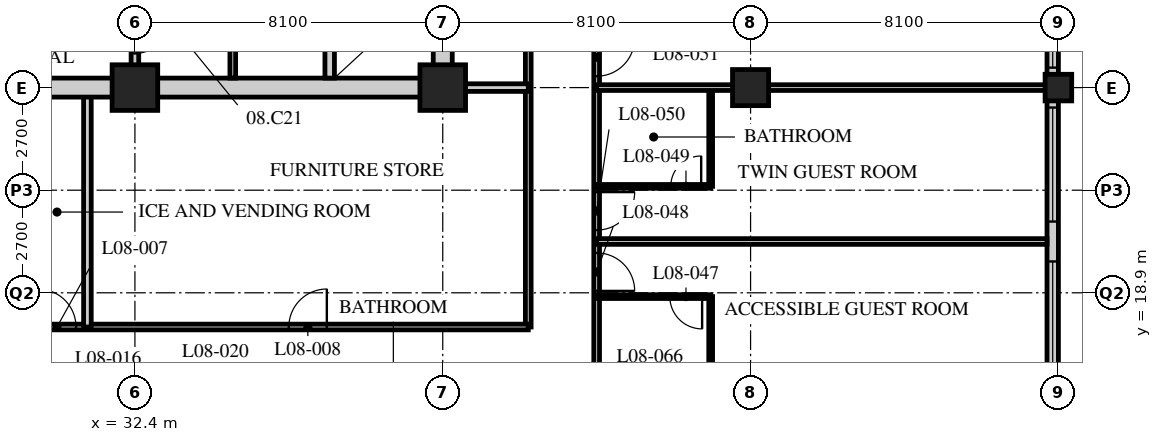
"""IFC4 building model, lengths in metres.
Left out: names, types, materials, properties, quantities, classifications, styles, units other than length and angle.
Written with IfcOpenShell. Run it as: python <this file> out.ifc"""

import sys

from ifc_helpers import new_model, si_unit, direction, frame, frame_2d, origin, origin_2d, place, context, subcontext, project, spatial, rectangle, hollow_rectangle, extrude, element, fill, save


model = new_model("IFC4")
c1 = context("Model", 3, precision=1e-05, world=origin(), true_north=direction((0.0, 1.0)))
c2 = subcontext(c1, "Body", "Model", "MODEL_VIEW")
j1 = project(units=[si_unit("LENGTHUNIT", "METRE"), si_unit("PLANEANGLEUNIT", "RADIAN")], contexts=[c1])
p1 = place(None, origin())
s1 = spatial("IfcSite", under=j1, at=p1, CompositionType="ELEMENT")
p2 = place(p1, origin())
s2 = spatial("IfcBuilding", under=s1, at=p2, CompositionType="ELEMENT")
p3 = place(p2, frame((0.0, 0.0, 39.8)))
s3 = spatial("IfcBuildingStorey", under=s2, at=p3, CompositionType="ELEMENT", Elevation=39.8)
for number, where, z_axis, x_axis in (
    (1, (32.4, 24.3, 0.0), (0.0, 0.0, 1.0), (1.0, 0.0, 0.0)),
    (2, (40.5, 24.3, 0.0), (0.0, 0.0, 1.0), (1.0, 0.0, 0.0)),
):
    element("IfcColumn", number, at=place(p3, frame(where, z_axis=z_axis, x_axis=x_axis)), inside=s3, PredefinedType="COLUMN", context=c2, shape_type="SweptSolid", body=[
        extrude(hollow_rectangle(XDim=1.2, YDim=1.2, WallThickness=0.12, at=origin_2d()), origin(), (0.0, 0.0, 1.0), 3.4),
    ])
p4 = place(p3, frame((48.6, 24.3, 0.0), z_axis=(0.0, 0.0, 1.0), x_axis=(1.0, 0.0, 0.0)))
e3 = element("IfcColumn", 3, at=p4, inside=s3, PredefinedType="COLUMN", context=c2, shape_type="SweptSolid", body=[
    extrude(hollow_rectangle(XDim=0.95, YDim=0.95, WallThickness=0.095, at=origin_2d()), origin(), (0.0, 0.0, 1.0), 3.4),
])
p5 = place(p3, frame((56.7, 24.3, 0.0), z_axis=(0.0, 0.0, 1.0), x_axis=(1.0, 0.0, 0.0)))
e4 = element("IfcColumn", 4, at=p5, inside=s3, PredefinedType="COLUMN", context=c2, shape_type="SweptSolid", body=[
    extrude(hollow_rectangle(XDim=0.7, YDim=0.7, WallThickness=0.06, at=origin_2d()), origin(), (0.0, 0.0, 1.0), 3.4),
])
p6 = place(p3, frame((56.55, 8.4, 0.0), z_axis=(0.0, 0.0, 1.0), x_axis=(0.0, 1.0, 0.0)))
e5 = element("IfcWall", 5, at=p6, inside=s3, PredefinedType="SOLIDWALL", context=c2, shape_type="SweptSolid", body=[
    extrude(rectangle(XDim=32.1, YDim=0.3, at=frame_2d((16.05, 0.0))), origin(), (0.0, 0.0, 1.0), 3.19),
])
p7 = place(p6, frame((0.225, 0.0, 0.9)))
e6 = element("IfcOpeningElement", 6, at=p7, cuts=e5, PredefinedType="OPENING", context=c2, shape_type="SweptSolid", body=[
    extrude(rectangle(XDim=3.0, YDim=2.0, at=frame_2d((1.5, 1.0))), frame((0.0, 0.16, 0.0), z_axis=(0.0, -1.0, 0.0), x_axis=(1.0, 0.0, 0.0)), (0.0, 0.0, 1.0), 0.32),
])
p8 = place(p6, frame((4.275, 0.0, 0.9)))
e7 = element("IfcOpeningElement", 7, at=p8, cuts=e5, PredefinedType="OPENING", context=c2, shape_type="SweptSolid", body=[
    extrude(rectangle(XDim=3.0, YDim=2.0, at=frame_2d((1.5, 1.0))), frame((0.0, 0.16, 0.0), z_axis=(0.0, -1.0, 0.0), x_axis=(1.0, 0.0, 0.0)), (0.0, 0.0, 1.0), 0.32),
])
p9 = place(p6, frame((8.325, 0.0, 0.9)))
e8 = element("IfcOpeningElement", 8, at=p9, cuts=e5, PredefinedType="OPENING", context=c2, shape_type="SweptSolid", body=[
    extrude(rectangle(XDim=3.0, YDim=2.0, at=frame_2d((1.5, 1.0))), frame((0.0, 0.16, 0.0), z_axis=(0.0, -1.0, 0.0), x_axis=(1.0, 0.0, 0.0)), (0.0, 0.0, 1.0), 0.32),
])
p10 = place(p6, frame((12.375, 0.0, 0.9)))
e9 = element("IfcOpeningElement", 9, at=p10, cuts=e5, PredefinedType="OPENING", context=c2, shape_type="SweptSolid", body=[
    extrude(rectangle(XDim=3.0, YDim=2.0, at=frame_2d((1.5, 1.0))), frame((0.0, 0.16, 0.0), z_axis=(0.0, -1.0, 0.0), x_axis=(1.0, 0.0, 0.0)), (0.0, 0.0, 1.0), 0.32),
])
p11 = place(p6, frame((16.425, 0.0, 0.9)))
e10 = element("IfcOpeningElement", 10, at=p11, cuts=e5, PredefinedType="OPENING", context=c2, shape_type="SweptSolid", body=[
    extrude(rectangle(XDim=3.0, YDim=2.0, at=frame_2d((1.5, 1.0))), frame((0.0, 0.16, 0.0), z_axis=(0.0, -1.0, 0.0), x_axis=(1.0, 0.0, 0.0)), (0.0, 0.0, 1.0), 0.32),
])
p12 = place(p6, frame((20.475, 0.0, 0.9)))
e11 = element("IfcOpeningElement", 11, at=p12, cuts=e5, PredefinedType="OPENING", context=c2, shape_type="SweptSolid", body=[
    extrude(rectangle(XDim=3.0, YDim=2.0, at=frame_2d((1.5, 1.0))), frame((0.0, 0.16, 0.0), z_axis=(0.0, -1.0, 0.0), x_axis=(1.0, 0.0, 0.0)), (0.0, 0.0, 1.0), 0.32),
])
p13 = place(p6, frame((24.525, 0.0, 0.9)))
e12 = element("IfcOpeningElement", 12, at=p13, cuts=e5, PredefinedType="OPENING", context=c2, shape_type="SweptSolid", body=[
    extrude(rectangle(XDim=3.0, YDim=2.0, at=frame_2d((1.5, 1.0))), frame((0.0, 0.16, 0.0), z_axis=(0.0, -1.0, 0.0), x_axis=(1.0, 0.0, 0.0)), (0.0, 0.0, 1.0), 0.32),
])
p14 = place(p6, frame((28.575, 0.0, 0.9)))
e13 = element("IfcOpeningElement", 13, at=p14, cuts=e5, PredefinedType="OPENING", context=c2, shape_type="SweptSolid", body=[
    extrude(rectangle(XDim=3.0, YDim=2.0, at=frame_2d((1.5, 1.0))), frame((0.0, 0.16, 0.0), z_axis=(0.0, -1.0, 0.0), x_axis=(1.0, 0.0, 0.0)), (0.0, 0.0, 1.0), 0.32),
])
p15 = place(p3, frame((44.55, 16.2, 0.0), z_axis=(0.0, 0.0, 1.0), x_axis=(0.0, 1.0, 0.0)))
e14 = element("IfcWall", 14, at=p15, inside=s3, PredefinedType="PARTITIONING", context=c2, shape_type="SweptSolid", body=[
    extrude(rectangle(XDim=26.1, YDim=0.15, at=frame_2d((13.05, 0.0))), origin(), (0.0, 0.0, 1.0), 3.19),
])
p16 = place(p15, frame((2.75, 0.0, 0.0)))
e15 = element("IfcOpeningElement", 15, at=p16, cuts=e14, PredefinedType="OPENING", context=c2, shape_type="SweptSolid", body=[
    extrude(rectangle(XDim=1.0, YDim=2.1, at=frame_2d((0.5, 1.05))), frame((0.0, 0.085, 0.0), z_axis=(0.0, -1.0, 0.0), x_axis=(1.0, 0.0, 0.0)), (0.0, 0.0, 1.0), 0.17),
])
p17 = place(p15, frame((4.35, 0.0, 0.0)))
e16 = element("IfcOpeningElement", 16, at=p17, cuts=e14, PredefinedType="OPENING", context=c2, shape_type="SweptSolid", body=[
    extrude(rectangle(XDim=1.0, YDim=2.1, at=frame_2d((0.5, 1.05))), frame((0.0, 0.085, 0.0), z_axis=(0.0, -1.0, 0.0), x_axis=(1.0, 0.0, 0.0)), (0.0, 0.0, 1.0), 0.17),
])
p18 = place(p15, frame((8.4, 0.0, 0.0)))
e17 = element("IfcOpeningElement", 17, at=p18, cuts=e14, PredefinedType="OPENING", context=c2, shape_type="SweptSolid", body=[
    extrude(rectangle(XDim=1.0, YDim=2.1, at=frame_2d((0.5, 1.05))), frame((0.0, 0.085, 0.0), z_axis=(0.0, -1.0, 0.0), x_axis=(1.0, 0.0, 0.0)), (0.0, 0.0, 1.0), 0.17),
])
p19 = place(p15, frame((14.6, 0.0, 0.0)))
e18 = element("IfcOpeningElement", 18, at=p19, cuts=e14, PredefinedType="OPENING", context=c2, shape_type="SweptSolid", body=[
    extrude(rectangle(XDim=1.0, YDim=2.1, at=frame_2d((0.5, 1.05))), frame((0.0, 0.085, 0.0), z_axis=(0.0, -1.0, 0.0), x_axis=(1.0, 0.0, 0.0)), (0.0, 0.0, 1.0), 0.17),
])
p20 = place(p15, frame((18.65, 0.0, 0.0)))
e19 = element("IfcOpeningElement", 19, at=p20, cuts=e14, PredefinedType="OPENING", context=c2, shape_type="SweptSolid", body=[
    extrude(rectangle(XDim=1.0, YDim=2.1, at=frame_2d((0.5, 1.05))), frame((0.0, 0.085, 0.0), z_axis=(0.0, -1.0, 0.0), x_axis=(1.0, 0.0, 0.0)), (0.0, 0.0, 1.0), 0.17),
])
p21 = place(p15, frame((22.65, 0.0, 0.0)))
e20 = element("IfcOpeningElement", 20, at=p21, cuts=e14, PredefinedType="OPENING", context=c2, shape_type="SweptSolid", body=[
    extrude(rectangle(XDim=1.0, YDim=2.1, at=frame_2d((0.5, 1.05))), frame((0.0, 0.085, 0.0), z_axis=(0.0, -1.0, 0.0), x_axis=(1.0, 0.0, 0.0)), (0.0, 0.0, 1.0), 0.17),
])
p22 = place(p3, frame((42.75, 18.0, 0.0), z_axis=(0.0, 0.0, 1.0), x_axis=(0.0, 1.0, 0.0)))
e21 = element("IfcWall", 21, at=p22, inside=s3, PredefinedType="PARTITIONING", context=c2, shape_type="SweptSolid", body=[
    extrude(rectangle(XDim=22.5, YDim=0.15, at=frame_2d((11.25, 0.0))), origin(), (0.0, 0.0, 1.0), 3.19),
])
p23 = place(p22, frame((9.85, 0.0, 0.0)))
e22 = element("IfcOpeningElement", 22, at=p23, cuts=e21, PredefinedType="OPENING", context=c2, shape_type="SweptSolid", body=[
    extrude(rectangle(XDim=1.0, YDim=2.1, at=frame_2d((0.5, 1.05))), frame((0.0, 0.085, 0.0), z_axis=(0.0, -1.0, 0.0), x_axis=(1.0, 0.0, 0.0)), (0.0, 0.0, 1.0), 0.17),
])
p24 = place(p22, frame((17.95, 0.0, 0.0)))
e23 = element("IfcOpeningElement", 23, at=p24, cuts=e21, PredefinedType="OPENING", context=c2, shape_type="SweptSolid", body=[
    extrude(rectangle(XDim=1.0, YDim=2.1, at=frame_2d((0.5, 1.05))), frame((0.0, 0.085, 0.0), z_axis=(0.0, -1.0, 0.0), x_axis=(1.0, 0.0, 0.0)), (0.0, 0.0, 1.0), 0.17),
])
p25 = place(p3, frame((29.56, 18.0, 0.0), z_axis=(0.0, 0.0, 1.0), x_axis=(1.0, 0.0, 0.0)))
e24 = element("IfcWall", 24, at=p25, inside=s3, PredefinedType="PARTITIONING", context=c2, shape_type="SweptSolid", body=[
    extrude(rectangle(XDim=13.19, YDim=0.15, at=frame_2d((6.595, 0.0))), origin(), (0.0, 0.0, 1.0), 3.19),
])
p26 = place(p25, frame((0.29, 0.0, 0.0)))
e25 = element("IfcOpeningElement", 25, at=p26, cuts=e24, PredefinedType="OPENING", context=c2, shape_type="SweptSolid", body=[
    extrude(rectangle(XDim=1.0, YDim=2.1, at=frame_2d((0.5, 1.05))), frame((0.0, 0.085, 0.0), z_axis=(0.0, -1.0, 0.0), x_axis=(1.0, 0.0, 0.0)), (0.0, 0.0, 1.0), 0.17),
])
p27 = place(p25, frame((6.89, 0.0, 0.0)))
e26 = element("IfcOpeningElement", 26, at=p27, cuts=e24, PredefinedType="OPENING", context=c2, shape_type="SweptSolid", body=[
    extrude(rectangle(XDim=1.0, YDim=2.1, at=frame_2d((0.5, 1.05))), frame((0.0, 0.085, 0.0), z_axis=(0.0, -1.0, 0.0), x_axis=(1.0, 0.0, 0.0)), (0.0, 0.0, 1.0), 0.17),
])
p28 = place(p3, frame((31.15, 18.0, 0.0), z_axis=(0.0, 0.0, 1.0), x_axis=(0.0, 1.0, 0.0)))
e27 = element("IfcWall", 27, at=p28, inside=s3, PredefinedType="SOLIDWALL", context=c2, shape_type="SweptSolid", body=[
    extrude(rectangle(XDim=6.3, YDim=0.2, at=frame_2d((3.15, 0.0))), origin(), (0.0, 0.0, 1.0), 3.19),
])
p29 = place(p3, frame((40.5, 24.3, 0.0), z_axis=(0.0, 0.0, 1.0), x_axis=(1.0, 0.0, 0.0)))
e28 = element("IfcWall", 28, at=p29, inside=s3, PredefinedType="SOLIDWALL", context=c2, shape_type="SweptSolid", body=[
    extrude(rectangle(XDim=2.25, YDim=0.2, at=frame_2d((1.125, 0.0))), origin(), (0.0, 0.0, 1.0), 2.578),
])
p30 = place(p3, frame((47.55, 16.2, 0.0), z_axis=(0.0, 0.0, 1.0), x_axis=(0.0, 1.0, 0.0)))
e29 = element("IfcWall", 29, at=p30, inside=s3, PredefinedType="PARTITIONING", context=c2, shape_type="SweptSolid", body=[
    extrude(rectangle(XDim=2.6, YDim=0.1, at=frame_2d((1.3, 0.0))), origin(), (0.0, 0.0, 1.0), 3.19),
])
p31 = place(p3, frame((44.55, 18.8, 0.0), z_axis=(0.0, 0.0, 1.0), x_axis=(1.0, 0.0, 0.0)))
e30 = element("IfcWall", 30, at=p31, inside=s3, PredefinedType="PARTITIONING", context=c2, shape_type="SweptSolid", body=[
    extrude(rectangle(XDim=3.0, YDim=0.1, at=frame_2d((1.5, 0.0))), origin(), (0.0, 0.0, 1.0), 3.19),
])
p32 = place(p31, frame((1.925, 0.0, 0.0)))
e31 = element("IfcOpeningElement", 31, at=p32, cuts=e30, PredefinedType="OPENING", context=c2, shape_type="SweptSolid", body=[
    extrude(rectangle(XDim=0.85, YDim=2.1, at=frame_2d((0.425, 1.05))), frame((0.0, 0.06, 0.0), z_axis=(0.0, -1.0, 0.0), x_axis=(1.0, 0.0, 0.0)), (0.0, 0.0, 1.0), 0.12),
])
p33 = place(p3, frame((44.55, 20.25, 0.0), z_axis=(0.0, 0.0, 1.0), x_axis=(1.0, 0.0, 0.0)))
e32 = element("IfcWall", 32, at=p33, inside=s3, PredefinedType="PARTITIONING", context=c2, shape_type="SweptSolid", body=[
    extrude(rectangle(XDim=11.85, YDim=0.15, at=frame_2d((5.925, 0.0))), origin(), (0.0, 0.0, 1.0), 3.19),
])
p34 = place(p3, frame((47.55, 21.7, 0.0), z_axis=(0.0, 0.0, 1.0), x_axis=(0.0, 1.0, 0.0)))
e33 = element("IfcWall", 33, at=p34, inside=s3, PredefinedType="PARTITIONING", context=c2, shape_type="SweptSolid", body=[
    extrude(rectangle(XDim=2.6, YDim=0.1, at=frame_2d((1.3, 0.0))), origin(), (0.0, 0.0, 1.0), 3.19),
])
p35 = place(p3, frame((44.55, 21.7, 0.0), z_axis=(0.0, 0.0, 1.0), x_axis=(1.0, 0.0, 0.0)))
e34 = element("IfcWall", 34, at=p35, inside=s3, PredefinedType="PARTITIONING", context=c2, shape_type="SweptSolid", body=[
    extrude(rectangle(XDim=3.0, YDim=0.1, at=frame_2d((1.5, 0.0))), origin(), (0.0, 0.0, 1.0), 3.19),
])
p36 = place(p35, frame((1.95, 0.0, 0.0)))
e35 = element("IfcOpeningElement", 35, at=p36, cuts=e34, PredefinedType="OPENING", context=c2, shape_type="SweptSolid", body=[
    extrude(rectangle(XDim=0.8, YDim=2.1, at=frame_2d((0.4, 1.05))), frame((0.0, 0.06, 0.0), z_axis=(0.0, -1.0, 0.0), x_axis=(1.0, 0.0, 0.0)), (0.0, 0.0, 1.0), 0.12),
])
p37 = place(p3, frame((44.55, 24.3, 0.0), z_axis=(0.0, 0.0, 1.0), x_axis=(1.0, 0.0, 0.0)))
e36 = element("IfcWall", 36, at=p37, inside=s3, PredefinedType="PARTITIONING", context=c2, shape_type="SweptSolid", body=[
    extrude(rectangle(XDim=11.85, YDim=0.15, at=frame_2d((5.925, 0.0))), origin(), (0.0, 0.0, 1.0), 2.578),
])
p38 = place(p3, frame((15.95, 24.3, 0.0), z_axis=(0.0, 0.0, 1.0), x_axis=(1.0, 0.0, 0.0)))
e37 = element("IfcWall", 37, at=p38, inside=s3, PredefinedType="SOLIDWALL", context=c2, shape_type="SweptSolid", body=[
    extrude(rectangle(XDim=24.8, YDim=0.5, at=frame_2d((12.4, 0.0))), origin(), (0.0, 0.0, 1.0), 2.54),
])
p39 = place(p38, frame((11.5, 0.0, 0.0)))
e38 = element("IfcOpeningElement", 38, at=p39, cuts=e37, PredefinedType="OPENING", context=c2, shape_type="SweptSolid", body=[
    extrude(rectangle(XDim=1.8, YDim=2.4, at=frame_2d((0.9, 1.2))), frame((0.0, 0.26, 0.0), z_axis=(0.0, -1.0, 0.0), x_axis=(1.0, 0.0, 0.0)), (0.0, 0.0, 1.0), 0.52),
])
p40 = place(p3, frame((40.5, 24.55, 0.0), z_axis=(0.0, 0.0, 1.0), x_axis=(0.0, 1.0, 0.0)))
e39 = element("IfcWall", 39, at=p40, inside=s3, PredefinedType="SOLIDWALL", context=c2, shape_type="SweptSolid", body=[
    extrude(rectangle(XDim=15.7, YDim=0.5, at=frame_2d((7.85, 0.0))), origin(), (0.0, 0.0, 1.0), 2.578),
])
p41 = place(p3, frame((37.525, 24.55, 0.0), z_axis=(0.0, 0.0, 1.0), x_axis=(0.0, 1.0, 0.0)))
e40 = element("IfcWall", 40, at=p41, inside=s3, PredefinedType="SOLIDWALL", context=c2, shape_type="SweptSolid", body=[
    extrude(rectangle(XDim=7.75, YDim=0.25, at=frame_2d((3.875, 0.0))), origin(), (0.0, 0.0, 1.0), 3.19),
])
p42 = place(p3, frame((32.4, 24.55, 0.0), z_axis=(0.0, 0.0, 1.0), x_axis=(0.0, 1.0, 0.0)))
e41 = element("IfcWall", 41, at=p42, inside=s3, PredefinedType="PARTITIONING", context=c2, shape_type="SweptSolid", body=[
    extrude(rectangle(XDim=7.75, YDim=0.2, at=frame_2d((3.875, 0.0))), origin(), (0.0, 0.0, 1.0), 2.578),
])
p43 = place(p42, frame((0.65, 0.0, 0.0)))
e42 = element("IfcOpeningElement", 42, at=p43, cuts=e41, PredefinedType="OPENING", context=c2, shape_type="SweptSolid", body=[
    extrude(rectangle(XDim=0.9, YDim=2.1, at=frame_2d((0.45, 1.05))), frame((0.0, 0.11, 0.0), z_axis=(0.0, -1.0, 0.0), x_axis=(1.0, 0.0, 0.0)), (0.0, 0.0, 1.0), 0.22),
])
p44 = place(p42, frame((2.15, 0.0, 0.0)))
e43 = element("IfcOpeningElement", 43, at=p44, cuts=e41, PredefinedType="OPENING", context=c2, shape_type="SweptSolid", body=[
    extrude(rectangle(XDim=0.9, YDim=2.1, at=frame_2d((0.45, 1.05))), frame((0.0, 0.11, 0.0), z_axis=(0.0, -1.0, 0.0), x_axis=(1.0, 0.0, 0.0)), (0.0, 0.0, 1.0), 0.22),
])
p45 = place(p42, frame((3.8, 0.0, 0.0)))
e44 = element("IfcOpeningElement", 44, at=p45, cuts=e41, PredefinedType="OPENING", context=c2, shape_type="SweptSolid", body=[
    extrude(rectangle(XDim=1.0, YDim=2.1, at=frame_2d((0.5, 1.05))), frame((0.0, 0.11, 0.0), z_axis=(0.0, -1.0, 0.0), x_axis=(1.0, 0.0, 0.0)), (0.0, 0.0, 1.0), 0.22),
])
p46 = place(p42, frame((6.05, 0.0, 0.0)))
e45 = element("IfcOpeningElement", 45, at=p46, cuts=e41, PredefinedType="OPENING", context=c2, shape_type="SweptSolid", body=[
    extrude(rectangle(XDim=0.9, YDim=2.1, at=frame_2d((0.45, 1.05))), frame((0.0, 0.11, 0.0), z_axis=(0.0, -1.0, 0.0), x_axis=(1.0, 0.0, 0.0)), (0.0, 0.0, 1.0), 0.22),
])
p47 = place(p3, frame((34.975, 24.55, 0.0), z_axis=(0.0, 0.0, 1.0), x_axis=(0.0, 1.0, 0.0)))
e46 = element("IfcWall", 46, at=p47, inside=s3, PredefinedType="PARTITIONING", context=c2, shape_type="SweptSolid", body=[
    extrude(rectangle(XDim=1.7, YDim=0.15, at=frame_2d((0.85, 0.0))), origin(), (0.0, 0.0, 1.0), 3.19),
])
p48 = place(p9, origin())
e47 = element("IfcWindow", 47, at=p48, inside=s3, PartitioningType="SINGLE_PANEL", PredefinedType="WINDOW", context=c2, shape_type="SweptSolid", body=[
    extrude(rectangle(XDim=3.0, YDim=2.0, at=frame_2d((1.5, 1.0))), frame((0.0, 0.03, 0.0), z_axis=(0.0, -1.0, 0.0), x_axis=(1.0, 0.0, 0.0)), (0.0, 0.0, 1.0), 0.06),
])
fill(e8, e47)
p49 = place(p10, origin())
e48 = element("IfcWindow", 48, at=p49, inside=s3, PartitioningType="SINGLE_PANEL", PredefinedType="WINDOW", context=c2, shape_type="SweptSolid", body=[
    extrude(rectangle(XDim=3.0, YDim=2.0, at=frame_2d((1.5, 1.0))), frame((0.0, 0.03, 0.0), z_axis=(0.0, -1.0, 0.0), x_axis=(1.0, 0.0, 0.0)), (0.0, 0.0, 1.0), 0.06),
])
fill(e9, e48)
p50 = place(p11, origin())
e49 = element("IfcWindow", 49, at=p50, inside=s3, PartitioningType="SINGLE_PANEL", PredefinedType="WINDOW", context=c2, shape_type="SweptSolid", body=[
    extrude(rectangle(XDim=3.0, YDim=2.0, at=frame_2d((1.5, 1.0))), frame((0.0, 0.03, 0.0), z_axis=(0.0, -1.0, 0.0), x_axis=(1.0, 0.0, 0.0)), (0.0, 0.0, 1.0), 0.06),
])
fill(e10, e49)
p51 = place(p26, origin())
e50 = element("IfcDoor", 50, at=p51, inside=s3, OperationType="SINGLE_SWING_LEFT", PredefinedType="DOOR", context=c2, shape_type="SweptSolid", body=[
    extrude(rectangle(XDim=1.0, YDim=2.1, at=frame_2d((0.5, 1.05))), frame((0.0, 0.025, 0.0), z_axis=(0.0, -1.0, 0.0), x_axis=(1.0, 0.0, 0.0)), (0.0, 0.0, 1.0), 0.05),
])
fill(e25, e50)
p52 = place(p27, origin())
e51 = element("IfcDoor", 51, at=p52, inside=s3, OperationType="SINGLE_SWING_RIGHT", PredefinedType="DOOR", context=c2, shape_type="SweptSolid", body=[
    extrude(rectangle(XDim=1.0, YDim=2.1, at=frame_2d((0.5, 1.05))), frame((0.0, 0.025, 0.0), z_axis=(0.0, -1.0, 0.0), x_axis=(1.0, 0.0, 0.0)), (0.0, 0.0, 1.0), 0.05),
])
fill(e26, e51)
p53 = place(p32, origin())
e52 = element("IfcDoor", 52, at=p53, inside=s3, OperationType="SINGLE_SWING_LEFT", PredefinedType="DOOR", context=c2, shape_type="SweptSolid", body=[
    extrude(rectangle(XDim=0.85, YDim=2.1, at=frame_2d((0.425, 1.05))), frame((0.0, 0.025, 0.0), z_axis=(0.0, -1.0, 0.0), x_axis=(1.0, 0.0, 0.0)), (0.0, 0.0, 1.0), 0.05),
])
fill(e31, e52)
p54 = place(p16, origin())
e53 = element("IfcDoor", 53, at=p54, inside=s3, OperationType="SINGLE_SWING_RIGHT", PredefinedType="DOOR", context=c2, shape_type="SweptSolid", body=[
    extrude(rectangle(XDim=1.0, YDim=2.1, at=frame_2d((0.5, 1.05))), frame((0.0, 0.025, 0.0), z_axis=(0.0, -1.0, 0.0), x_axis=(1.0, 0.0, 0.0)), (0.0, 0.0, 1.0), 0.05),
])
fill(e15, e53)
p55 = place(p36, origin())
e54 = element("IfcDoor", 54, at=p55, inside=s3, OperationType="SINGLE_SWING_RIGHT", PredefinedType="DOOR", context=c2, shape_type="SweptSolid", body=[
    extrude(rectangle(XDim=0.8, YDim=2.1, at=frame_2d((0.4, 1.05))), frame((0.0, 0.025, 0.0), z_axis=(0.0, -1.0, 0.0), x_axis=(1.0, 0.0, 0.0)), (0.0, 0.0, 1.0), 0.05),
])
fill(e35, e54)
p56 = place(p17, origin())
e55 = element("IfcDoor", 55, at=p56, inside=s3, OperationType="SINGLE_SWING_LEFT", PredefinedType="DOOR", context=c2, shape_type="SweptSolid", body=[
    extrude(rectangle(XDim=1.0, YDim=2.1, at=frame_2d((0.5, 1.05))), frame((0.0, 0.025, 0.0), z_axis=(0.0, -1.0, 0.0), x_axis=(1.0, 0.0, 0.0)), (0.0, 0.0, 1.0), 0.05),
])
fill(e16, e55)
p57 = place(p18, origin())
e56 = element("IfcDoor", 56, at=p57, inside=s3, OperationType="SINGLE_SWING_LEFT", PredefinedType="DOOR", context=c2, shape_type="SweptSolid", body=[
    extrude(rectangle(XDim=1.0, YDim=2.1, at=frame_2d((0.5, 1.05))), frame((0.0, 0.025, 0.0), z_axis=(0.0, -1.0, 0.0), x_axis=(1.0, 0.0, 0.0)), (0.0, 0.0, 1.0), 0.05),
])
fill(e17, e56)
p58 = place(p43, origin())
e57 = element("IfcDoor", 57, at=p58, inside=s3, OperationType="SINGLE_SWING_LEFT", PredefinedType="DOOR", context=c2, shape_type="SweptSolid", body=[
    extrude(rectangle(XDim=0.9, YDim=2.1, at=frame_2d((0.45, 1.05))), frame((0.0, 0.025, 0.0), z_axis=(0.0, -1.0, 0.0), x_axis=(1.0, 0.0, 0.0)), (0.0, 0.0, 1.0), 0.05),
])
fill(e42, e57)
save(model, sys.argv[1])
